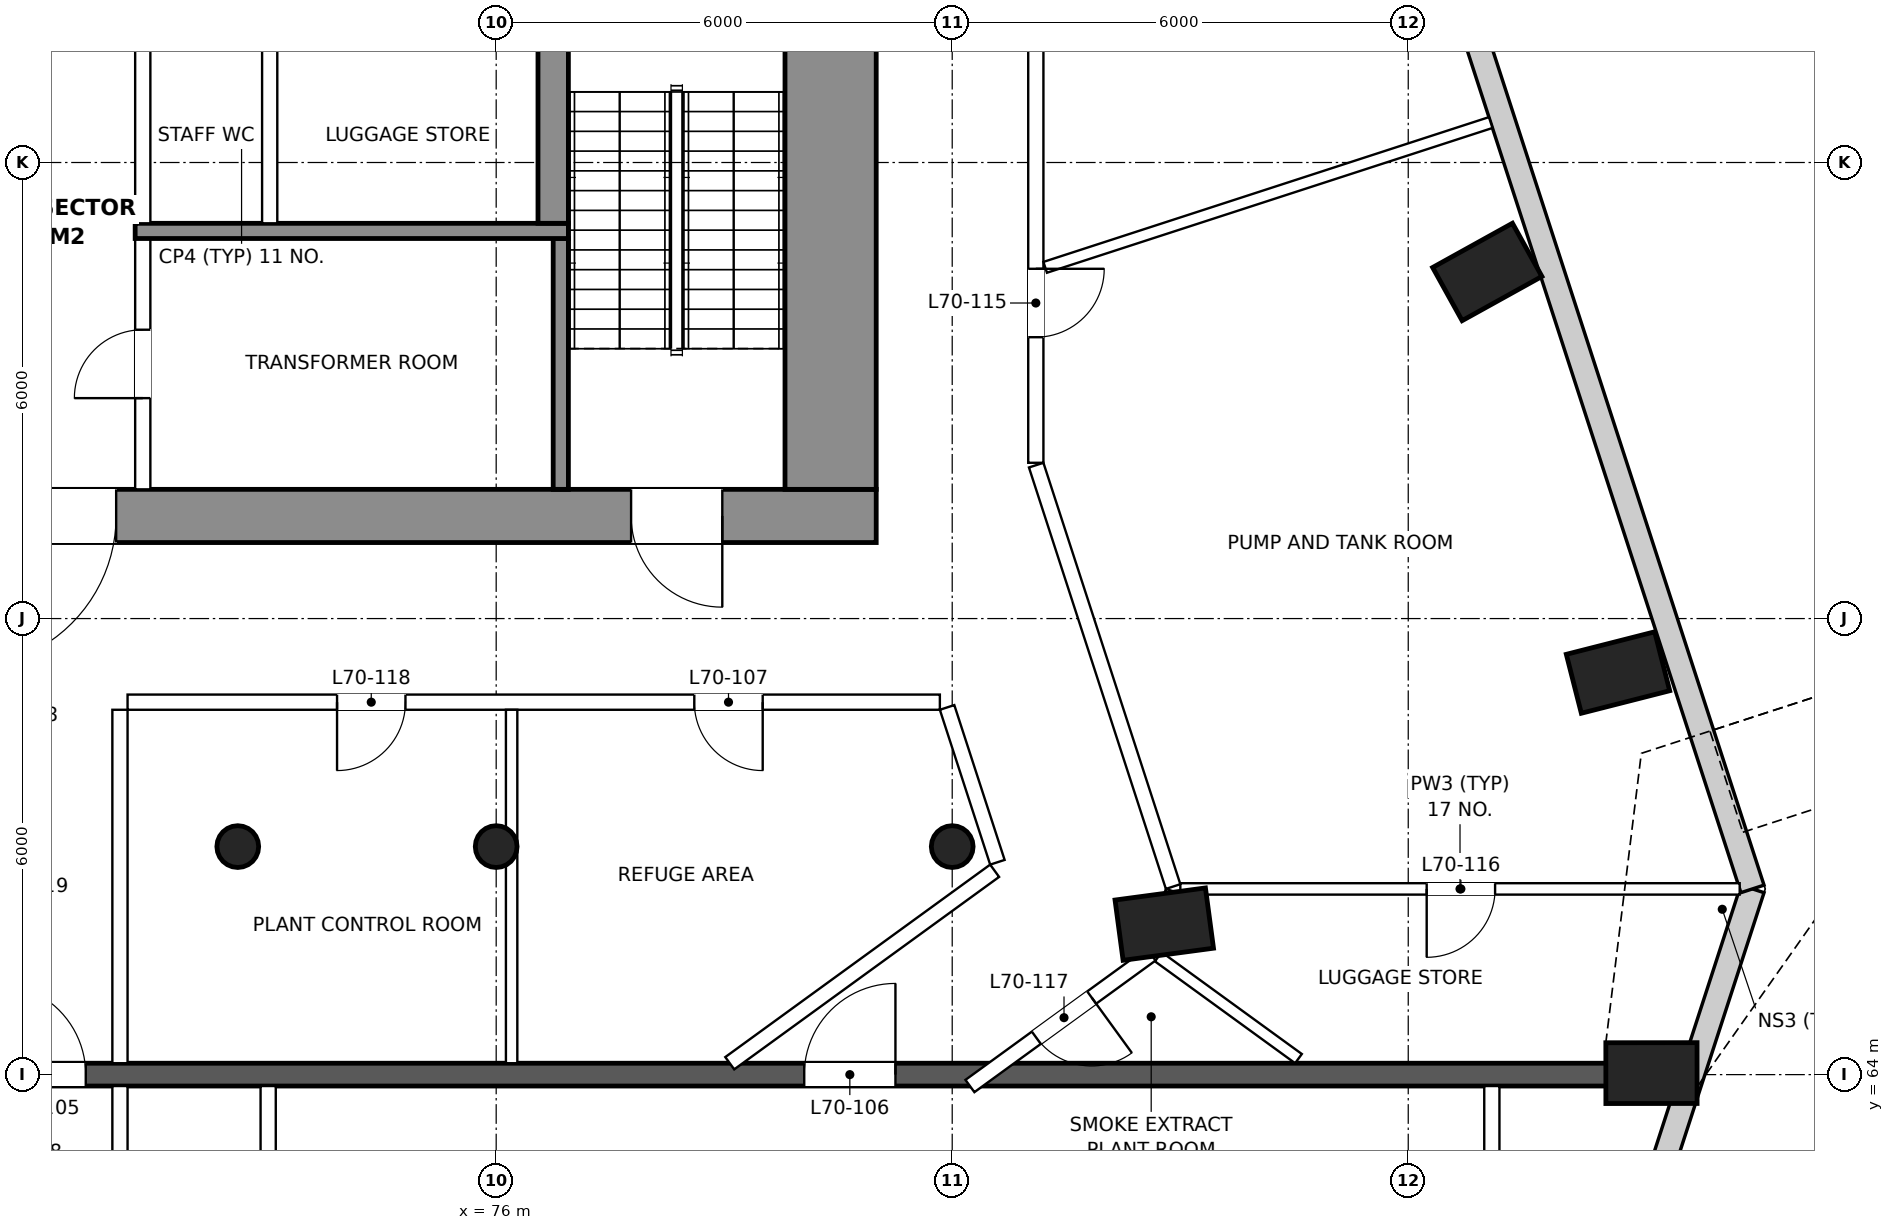
"""IFC4 building model, lengths in metres.
Left out: names, types, materials, properties, quantities, classifications, styles, units other than length and angle.
Written with IfcOpenShell. Run it as: python <this file> out.ifc"""

import sys

from ifc_helpers import new_model, si_unit, direction, frame, frame_2d, origin, origin_2d, place, context, subcontext, project, spatial, rectangle, circle, extrude, element, fill, save


model = new_model("IFC4")
c1 = context("Model", 3, precision=1e-05, world=origin(), true_north=direction((0.0, 1.0)))
c2 = subcontext(c1, "Body", "Model", "MODEL_VIEW")
j1 = project(units=[si_unit("LENGTHUNIT", "METRE"), si_unit("PLANEANGLEUNIT", "RADIAN")], contexts=[c1])
p1 = place(None, origin())
s1 = spatial("IfcSite", under=j1, at=p1, CompositionType="ELEMENT")
p2 = place(p1, origin())
s2 = spatial("IfcBuilding", under=s1, at=p2, CompositionType="ELEMENT")
p3 = place(p2, frame((0.0, 0.0, 295.1)))
s3 = spatial("IfcBuildingStorey", under=s2, at=p3, CompositionType="ELEMENT", Elevation=295.1)
for number, where, z_axis, x_axis in (
    (1, (91.2, 64.02, 0.0), (0.0, 0.0, 1.0), (0.001, -1.0, 0.0)),
    (2, (90.76, 69.29, 0.0), (0.0, 0.0, 1.0), (0.247, -0.969, 0.0)),
    (3, (89.04, 74.56, 0.0), (0.0, 0.0, 1.0), (0.485, -0.875, 0.0)),
    (4, (84.79, 65.98, 0.0), (0.0, 0.0, 1.0), (0.133, -0.991, 0.0)),
):
    element("IfcColumn", number, at=place(p3, frame(where, z_axis=z_axis, x_axis=x_axis)), inside=s3, PredefinedType="COLUMN", context=c2, shape_type="SweptSolid", body=[
        extrude(rectangle(XDim=0.8, YDim=1.2, at=origin_2d()), origin(), (0.0, 0.0, 1.0), 5.0),
    ])
for number, where, z_axis, x_axis in (
    (5, (72.6, 67.0, 0.0), (0.0, 0.0, 1.0), (1.0, 0.0, 0.0)),
    (6, (76.0, 67.0, 0.0), (0.0, 0.0, 1.0), (1.0, 0.0, 0.0)),
    (7, (82.0, 67.0, 0.0), (0.0, 0.0, 1.0), (1.0, 0.0, 0.0)),
):
    element("IfcColumn", number, at=place(p3, frame(where, z_axis=z_axis, x_axis=x_axis)), inside=s3, PredefinedType="COLUMN", context=c2, shape_type="SweptSolid", body=[
        extrude(circle(Radius=0.275, at=origin_2d()), origin(), (0.0, 0.0, 1.0), 5.0),
    ])
p4 = place(p3, frame((90.801, 61.126, 0.0), z_axis=(0.0, 0.0, 1.0), x_axis=(0.309039663735, 0.951049150275, 0.0)))
e8 = element("IfcWall", 8, at=p4, inside=s3, PredefinedType="SOLIDWALL", context=c2, shape_type="SweptSolid", body=[
    extrude(rectangle(XDim=5.591, YDim=0.32, at=frame_2d((2.795, 0.0))), origin(), (0.0, 0.0, 1.0), 4.6),
])
p5 = place(p3, frame((92.529, 66.443, 0.0), z_axis=(0.0, 0.0, 1.0), x_axis=(-0.30902093442, 0.951055236088, 0.0)))
e9 = element("IfcWall", 9, at=p5, inside=s3, PredefinedType="SOLIDWALL", context=c2, shape_type="SweptSolid", body=[
    extrude(rectangle(XDim=18.306, YDim=0.32, at=frame_2d((9.153, 0.0))), origin(), (0.0, 0.0, 1.0), 4.6),
])
p6 = place(p3, frame((59.0, 71.35, 0.0), z_axis=(0.0, 0.0, 1.0), x_axis=(1.0, 0.0, 0.0)))
e10 = element("IfcWall", 10, at=p6, inside=s3, PredefinedType="SHEAR", context=c2, shape_type="SweptSolid", body=[
    extrude(rectangle(XDim=22.0, YDim=0.7, at=frame_2d((11.0, 0.0))), origin(), (0.0, 0.0, 1.0), 5.0),
])
p7 = place(p6, frame((2.025, 0.0, 0.0)))
e11 = element("IfcOpeningElement", 11, at=p7, cuts=e10, PredefinedType="OPENING", context=c2, shape_type="SweptSolid", body=[
    extrude(rectangle(XDim=1.2, YDim=2.1, at=frame_2d((0.6, 1.05))), frame((0.0, 0.36, 0.0), z_axis=(0.0, -1.0, 0.0), x_axis=(1.0, 0.0, 0.0)), (0.0, 0.0, 1.0), 0.72),
])
p8 = place(p6, frame((18.775, 0.0, 0.0)))
e12 = element("IfcOpeningElement", 12, at=p8, cuts=e10, PredefinedType="OPENING", context=c2, shape_type="SweptSolid", body=[
    extrude(rectangle(XDim=1.2, YDim=2.1, at=frame_2d((0.6, 1.05))), frame((0.0, 0.36, 0.0), z_axis=(0.0, -1.0, 0.0), x_axis=(1.0, 0.0, 0.0)), (0.0, 0.0, 1.0), 0.72),
])
p9 = place(p6, frame((10.0, 0.0, 0.0)))
e13 = element("IfcOpeningElement", 13, at=p9, cuts=e10, PredefinedType="OPENING", context=c2, shape_type="SweptSolid", body=[
    extrude(rectangle(XDim=2.0, YDim=2.1, at=frame_2d((1.0, 1.05))), frame((0.0, 0.36, 0.0), z_axis=(0.0, -1.0, 0.0), x_axis=(1.0, 0.0, 0.0)), (0.0, 0.0, 1.0), 0.72),
])
p10 = place(p3, frame((71.35, 71.7, 0.0), z_axis=(0.0, 0.0, 1.0), x_axis=(0.0, 1.0, 0.0)))
e14 = element("IfcWall", 14, at=p10, inside=s3, PredefinedType="PARTITIONING", context=c2, shape_type="SweptSolid", body=[
    extrude(rectangle(XDim=3.3, YDim=0.2, at=frame_2d((1.65, 0.0))), origin(), (0.0, 0.0, 1.0), 4.6),
])
p11 = place(p10, frame((1.2, 0.0, 0.0)))
e15 = element("IfcOpeningElement", 15, at=p11, cuts=e14, PredefinedType="OPENING", context=c2, shape_type="SweptSolid", body=[
    extrude(rectangle(XDim=0.9, YDim=2.1, at=frame_2d((0.45, 1.05))), frame((0.0, 0.11, 0.0), z_axis=(0.0, -1.0, 0.0), x_axis=(1.0, 0.0, 0.0)), (0.0, 0.0, 1.0), 0.22),
])
p12 = place(p3, frame((76.85, 71.7, 0.0), z_axis=(0.0, 0.0, 1.0), x_axis=(0.0, 1.0, 0.0)))
e16 = element("IfcWall", 16, at=p12, inside=s3, PredefinedType="SHEAR", context=c2, shape_type="SweptSolid", body=[
    extrude(rectangle(XDim=3.3, YDim=0.2, at=frame_2d((1.65, 0.0))), origin(), (0.0, 0.0, 1.0), 5.0),
])
p13 = place(p3, frame((80.4, 71.7, 0.0), z_axis=(0.0, 0.0, 1.0), x_axis=(0.0, 1.0, 0.0)))
e17 = element("IfcWall", 17, at=p13, inside=s3, PredefinedType="SHEAR", context=c2, shape_type="SweptSolid", body=[
    extrude(rectangle(XDim=9.2, YDim=1.2, at=frame_2d((4.6, 0.0))), origin(), (0.0, 0.0, 1.0), 5.0),
])
p14 = place(p3, frame((71.25, 75.1, 0.0), z_axis=(0.0, 0.0, 1.0), x_axis=(1.0, 0.0, 0.0)))
e18 = element("IfcWall", 18, at=p14, inside=s3, PredefinedType="SHEAR", context=c2, shape_type="SweptSolid", body=[
    extrude(rectangle(XDim=5.7, YDim=0.2, at=frame_2d((2.85, 0.0))), origin(), (0.0, 0.0, 1.0), 5.0),
])
for number, where, z_axis, x_axis in (
    (19, (71.35, 75.2, 0.0), (0.0, 0.0, 1.0), (0.0, 1.0, 0.0)),
    (20, (73.02, 75.2, 0.0), (0.0, 0.0, 1.0), (0.0, 1.0, 0.0)),
):
    element("IfcWall", number, at=place(p3, frame(where, z_axis=z_axis, x_axis=x_axis)), inside=s3, PredefinedType="PARTITIONING", context=c2, shape_type="SweptSolid", body=[
        extrude(rectangle(XDim=2.3, YDim=0.2, at=frame_2d((1.15, 0.0))), origin(), (0.0, 0.0, 1.0), 4.6),
    ])
p15 = place(p3, frame((76.75, 75.2, 0.0), z_axis=(0.0, 0.0, 1.0), x_axis=(0.0, 1.0, 0.0)))
e21 = element("IfcWall", 21, at=p15, inside=s3, PredefinedType="SHEAR", context=c2, shape_type="SweptSolid", body=[
    extrude(rectangle(XDim=2.3, YDim=0.4, at=frame_2d((1.15, 0.0))), origin(), (0.0, 0.0, 1.0), 5.0),
])
p16 = place(p3, frame((48.433, 64.0, 0.0), z_axis=(0.0, 0.0, 1.0), x_axis=(1.0, 0.0, 0.0)))
e22 = element("IfcWall", 22, at=p16, inside=s3, PredefinedType="PARTITIONING", context=c2, shape_type="SweptSolid", body=[
    extrude(rectangle(XDim=43.134, YDim=0.3, at=frame_2d((21.567, 0.0))), origin(), (0.0, 0.0, 1.0), 3.9),
])
p17 = place(p16, frame((10.314, 0.0, 0.0)))
e23 = element("IfcOpeningElement", 23, at=p17, cuts=e22, PredefinedType="OPENING", context=c2, shape_type="SweptSolid", body=[
    extrude(rectangle(XDim=1.2, YDim=2.1, at=frame_2d((0.6, 1.05))), frame((0.0, 0.16, 0.0), z_axis=(0.0, -1.0, 0.0), x_axis=(1.0, 0.0, 0.0)), (0.0, 0.0, 1.0), 0.32),
])
p18 = place(p16, frame((20.967, 0.0, 0.0)))
e24 = element("IfcOpeningElement", 24, at=p18, cuts=e22, PredefinedType="OPENING", context=c2, shape_type="SweptSolid", body=[
    extrude(rectangle(XDim=1.2, YDim=2.1, at=frame_2d((0.6, 1.05))), frame((0.0, 0.16, 0.0), z_axis=(0.0, -1.0, 0.0), x_axis=(1.0, 0.0, 0.0)), (0.0, 0.0, 1.0), 0.32),
])
p19 = place(p16, frame((31.62, 0.0, 0.0)))
e25 = element("IfcOpeningElement", 25, at=p19, cuts=e22, PredefinedType="OPENING", context=c2, shape_type="SweptSolid", body=[
    extrude(rectangle(XDim=1.2, YDim=2.1, at=frame_2d((0.6, 1.05))), frame((0.0, 0.16, 0.0), z_axis=(0.0, -1.0, 0.0), x_axis=(1.0, 0.0, 0.0)), (0.0, 0.0, 1.0), 0.32),
])
p20 = place(p3, frame((83.1, 86.396, 0.0), z_axis=(0.0, 0.0, 1.0), x_axis=(0.0, -1.0, 0.0)))
e26 = element("IfcWall", 26, at=p20, inside=s3, PredefinedType="PARTITIONING", context=c2, shape_type="SweptSolid", body=[
    extrude(rectangle(XDim=14.347, YDim=0.2, at=frame_2d((7.173, 0.0))), origin(), (0.0, 0.0, 1.0), 4.15),
])
p21 = place(p20, frame((3.854, 0.0, 0.0)))
e27 = element("IfcOpeningElement", 27, at=p21, cuts=e26, PredefinedType="OPENING", context=c2, shape_type="SweptSolid", body=[
    extrude(rectangle(XDim=0.9, YDim=2.1, at=frame_2d((0.45, 1.05))), frame((0.0, 0.11, 0.0), z_axis=(0.0, -1.0, 0.0), x_axis=(1.0, 0.0, 0.0)), (0.0, 0.0, 1.0), 0.22),
])
p22 = place(p20, frame((7.751, 0.0, 0.0)))
e28 = element("IfcOpeningElement", 28, at=p22, cuts=e26, PredefinedType="OPENING", context=c2, shape_type="SweptSolid", body=[
    extrude(rectangle(XDim=0.9, YDim=2.1, at=frame_2d((0.45, 1.05))), frame((0.0, 0.11, 0.0), z_axis=(0.0, -1.0, 0.0), x_axis=(1.0, 0.0, 0.0)), (0.0, 0.0, 1.0), 0.22),
])
p23 = place(p20, frame((11.795, 0.0, 0.0)))
e29 = element("IfcOpeningElement", 29, at=p23, cuts=e26, PredefinedType="OPENING", context=c2, shape_type="SweptSolid", body=[
    extrude(rectangle(XDim=0.9, YDim=2.1, at=frame_2d((0.45, 1.05))), frame((0.0, 0.11, 0.0), z_axis=(0.0, -1.0, 0.0), x_axis=(1.0, 0.0, 0.0)), (0.0, 0.0, 1.0), 0.22),
])
p24 = place(p3, frame((83.105, 72.019, 0.0), z_axis=(0.0, 0.0, 1.0), x_axis=(0.30901978602, -0.95105560923, 0.0)))
e30 = element("IfcWall", 30, at=p24, inside=s3, PredefinedType="PARTITIONING", context=c2, shape_type="SweptSolid", body=[
    extrude(rectangle(XDim=5.83, YDim=0.2, at=frame_2d((2.915, 0.0))), origin(), (0.0, 0.0, 1.0), 4.6),
])
p25 = place(p3, frame((84.906, 66.412, 0.0), z_axis=(0.0, 0.0, 1.0), x_axis=(-0.309260889552, -0.950977235371, 0.0)))
e31 = element("IfcWall", 31, at=p25, inside=s3, PredefinedType="PARTITIONING", context=c2, shape_type="SweptSolid", body=[
    extrude(rectangle(XDim=0.821, YDim=0.2, at=frame_2d((0.411, 0.0))), origin(), (0.0, 0.0, 1.0), 3.6),
])
p26 = place(p3, frame((84.616, 65.582, 0.0), z_axis=(0.0, 0.0, 1.0), x_axis=(-0.809065647846, -0.587718280705, 0.0)))
e32 = element("IfcWall", 32, at=p26, inside=s3, PredefinedType="PARTITIONING", context=c2, shape_type="SweptSolid", body=[
    extrude(rectangle(XDim=2.946, YDim=0.2, at=frame_2d((1.473, 0.0))), origin(), (0.0, 0.0, 1.0), 3.6),
])
p27 = place(p26, frame((0.966, 0.0, 0.0)))
e33 = element("IfcOpeningElement", 33, at=p27, cuts=e32, PredefinedType="OPENING", context=c2, shape_type="SweptSolid", body=[
    extrude(rectangle(XDim=0.9, YDim=2.1, at=frame_2d((0.45, 1.05))), frame((0.0, 0.11, 0.0), z_axis=(0.0, -1.0, 0.0), x_axis=(1.0, 0.0, 0.0)), (0.0, 0.0, 1.0), 0.22),
])
p28 = place(p3, frame((89.1, 63.85, 0.0), z_axis=(0.0, 0.0, 1.0), x_axis=(0.0, -1.0, 0.0)))
e34 = element("IfcWall", 34, at=p28, inside=s3, PredefinedType="PARTITIONING", context=c2, shape_type="SweptSolid", body=[
    extrude(rectangle(XDim=3.762, YDim=0.2, at=frame_2d((1.881, 0.0))), origin(), (0.0, 0.0, 1.0), 4.6),
])
p29 = place(p3, frame((82.594, 66.794, 0.0), z_axis=(0.0, 0.0, 1.0), x_axis=(-0.309003597347, 0.951060869149, 0.0)))
e35 = element("IfcWall", 35, at=p29, inside=s3, PredefinedType="PARTITIONING", context=c2, shape_type="SweptSolid", body=[
    extrude(rectangle(XDim=2.142, YDim=0.2, at=frame_2d((1.071, 0.0))), origin(), (0.0, 0.0, 1.0), 4.6),
])
p30 = place(p3, frame((81.837, 68.9, 0.0), z_axis=(0.0, 0.0, 1.0), x_axis=(-1.0, 0.0, 0.0)))
e36 = element("IfcWall", 36, at=p30, inside=s3, PredefinedType="PARTITIONING", context=c2, shape_type="SweptSolid", body=[
    extrude(rectangle(XDim=10.688, YDim=0.2, at=frame_2d((5.344, 0.0))), origin(), (0.0, 0.0, 1.0), 4.6),
])
p31 = place(p30, frame((2.331, 0.0, 0.0)))
e37 = element("IfcOpeningElement", 37, at=p31, cuts=e36, PredefinedType="OPENING", context=c2, shape_type="SweptSolid", body=[
    extrude(rectangle(XDim=0.9, YDim=2.1, at=frame_2d((0.45, 1.05))), frame((0.0, 0.11, 0.0), z_axis=(0.0, -1.0, 0.0), x_axis=(1.0, 0.0, 0.0)), (0.0, 0.0, 1.0), 0.22),
])
p32 = place(p30, frame((7.031, 0.0, 0.0)))
e38 = element("IfcOpeningElement", 38, at=p32, cuts=e36, PredefinedType="OPENING", context=c2, shape_type="SweptSolid", body=[
    extrude(rectangle(XDim=0.9, YDim=2.1, at=frame_2d((0.45, 1.05))), frame((0.0, 0.11, 0.0), z_axis=(0.0, -1.0, 0.0), x_axis=(1.0, 0.0, 0.0)), (0.0, 0.0, 1.0), 0.22),
])
p33 = place(p3, frame((71.05, 68.8, 0.0), z_axis=(0.0, 0.0, 1.0), x_axis=(0.0, -1.0, 0.0)))
e39 = element("IfcWall", 39, at=p33, inside=s3, PredefinedType="PARTITIONING", context=c2, shape_type="SweptSolid", body=[
    extrude(rectangle(XDim=4.65, YDim=0.2, at=frame_2d((2.325, 0.0))), origin(), (0.0, 0.0, 1.0), 4.6),
])
p34 = place(p3, frame((71.05, 63.85, 0.0), z_axis=(0.0, 0.0, 1.0), x_axis=(0.0, -1.0, 0.0)))
e40 = element("IfcWall", 40, at=p34, inside=s3, PredefinedType="PARTITIONING", context=c2, shape_type="SweptSolid", body=[
    extrude(rectangle(XDim=5.333, YDim=0.2, at=frame_2d((2.667, 0.0))), origin(), (0.0, 0.0, 1.0), 3.6),
])
p35 = place(p3, frame((73.0, 59.789, 0.0), z_axis=(0.0, 0.0, 1.0), x_axis=(0.0, 1.0, 0.0)))
e41 = element("IfcWall", 41, at=p35, inside=s3, PredefinedType="PARTITIONING", context=c2, shape_type="SweptSolid", body=[
    extrude(rectangle(XDim=4.062, YDim=0.2, at=frame_2d((2.031, 0.0))), origin(), (0.0, 0.0, 1.0), 3.6),
])
p36 = place(p3, frame((79.073, 64.15, 0.0), z_axis=(0.0, 0.0, 1.0), x_axis=(0.809027628487, 0.587770615414, 0.0)))
e42 = element("IfcWall", 42, at=p36, inside=s3, PredefinedType="PARTITIONING", context=c2, shape_type="SweptSolid", body=[
    extrude(rectangle(XDim=4.308, YDim=0.2, at=frame_2d((2.154, 0.0))), origin(), (0.0, 0.0, 1.0), 3.6),
])
p37 = place(p3, frame((86.556, 64.211, 0.0), z_axis=(0.0, 0.0, 1.0), x_axis=(-0.809018460862, 0.587783233841, 0.0)))
e43 = element("IfcWall", 43, at=p37, inside=s3, PredefinedType="PARTITIONING", context=c2, shape_type="SweptSolid", body=[
    extrude(rectangle(XDim=2.28, YDim=0.15, at=frame_2d((1.14, 0.0))), origin(), (0.0, 0.0, 1.0), 4.6),
])
p38 = place(p3, frame((92.361, 66.443, 0.0), z_axis=(0.0, 0.0, 1.0), x_axis=(-1.0, 0.0, 0.0)))
e44 = element("IfcWall", 44, at=p38, inside=s3, PredefinedType="PARTITIONING", context=c2, shape_type="SweptSolid", body=[
    extrude(rectangle(XDim=7.359, YDim=0.15, at=frame_2d((3.68, 0.0))), origin(), (0.0, 0.0, 1.0), 3.9),
])
p39 = place(p38, frame((3.218, 0.0, 0.0)))
e45 = element("IfcOpeningElement", 45, at=p39, cuts=e44, PredefinedType="OPENING", context=c2, shape_type="SweptSolid", body=[
    extrude(rectangle(XDim=0.9, YDim=2.1, at=frame_2d((0.45, 1.05))), frame((0.0, 0.085, 0.0), z_axis=(0.0, -1.0, 0.0), x_axis=(1.0, 0.0, 0.0)), (0.0, 0.0, 1.0), 0.17),
])
p40 = place(p3, frame((89.085, 76.525, 0.0), z_axis=(0.0, 0.0, 1.0), x_axis=(-0.951060263663, -0.309005460926, 0.0)))
e46 = element("IfcWall", 46, at=p40, inside=s3, PredefinedType="PARTITIONING", context=c2, shape_type="SweptSolid", body=[
    extrude(rectangle(XDim=6.164, YDim=0.15, at=frame_2d((3.082, 0.0))), origin(), (0.0, 0.0, 1.0), 4.6),
])
p41 = place(p3, frame((76.203, 64.15, 0.0), z_axis=(0.0, 0.0, 1.0), x_axis=(0.0, 1.0, 0.0)))
e47 = element("IfcWall", 47, at=p41, inside=s3, PredefinedType="PARTITIONING", context=c2, shape_type="SweptSolid", body=[
    extrude(rectangle(XDim=4.65, YDim=0.15, at=frame_2d((2.325, 0.0))), origin(), (0.0, 0.0, 1.0), 4.6),
])
p42 = place(p8, frame((1.2, 0.0, 0.0), z_axis=(0.0, 0.0, 1.0), x_axis=(-1.0, 0.0, 0.0)))
e48 = element("IfcDoor", 48, at=p42, inside=s3, OperationType="SINGLE_SWING_LEFT", PredefinedType="DOOR", context=c2, shape_type="SweptSolid", body=[
    extrude(rectangle(XDim=1.2, YDim=2.1, at=frame_2d((0.6, 1.05))), frame((0.0, 0.025, 0.0), z_axis=(0.0, -1.0, 0.0), x_axis=(1.0, 0.0, 0.0)), (0.0, 0.0, 1.0), 0.05),
])
fill(e12, e48)
p43 = place(p9, frame((2.0, 0.0, 0.0), z_axis=(0.0, 0.0, 1.0), x_axis=(-1.0, 0.0, 0.0)))
e49 = element("IfcDoor", 49, at=p43, inside=s3, OperationType="DOUBLE_DOOR_SINGLE_SWING", PredefinedType="DOOR", context=c2, shape_type="SweptSolid", body=[
    extrude(rectangle(XDim=2.0, YDim=2.1, at=frame_2d((1.0, 1.05))), frame((0.0, 0.025, 0.0), z_axis=(0.0, -1.0, 0.0), x_axis=(1.0, 0.0, 0.0)), (0.0, 0.0, 1.0), 0.05),
])
fill(e13, e49)
p44 = place(p11, origin())
e50 = element("IfcDoor", 50, at=p44, inside=s3, OperationType="SINGLE_SWING_LEFT", PredefinedType="DOOR", context=c2, shape_type="SweptSolid", body=[
    extrude(rectangle(XDim=0.9, YDim=2.1, at=frame_2d((0.45, 1.05))), frame((0.0, 0.025, 0.0), z_axis=(0.0, -1.0, 0.0), x_axis=(1.0, 0.0, 0.0)), (0.0, 0.0, 1.0), 0.05),
])
fill(e15, e50)
p45 = place(p18, origin())
e51 = element("IfcDoor", 51, at=p45, inside=s3, OperationType="SINGLE_SWING_LEFT", PredefinedType="DOOR", context=c2, shape_type="SweptSolid", body=[
    extrude(rectangle(XDim=1.2, YDim=2.1, at=frame_2d((0.6, 1.05))), frame((0.0, 0.025, 0.0), z_axis=(0.0, -1.0, 0.0), x_axis=(1.0, 0.0, 0.0)), (0.0, 0.0, 1.0), 0.05),
])
fill(e24, e51)
p46 = place(p19, origin())
e52 = element("IfcDoor", 52, at=p46, inside=s3, OperationType="SINGLE_SWING_RIGHT", PredefinedType="DOOR", context=c2, shape_type="SweptSolid", body=[
    extrude(rectangle(XDim=1.2, YDim=2.1, at=frame_2d((0.6, 1.05))), frame((0.0, 0.025, 0.0), z_axis=(0.0, -1.0, 0.0), x_axis=(1.0, 0.0, 0.0)), (0.0, 0.0, 1.0), 0.05),
])
fill(e25, e52)
p47 = place(p31, origin())
e53 = element("IfcDoor", 53, at=p47, inside=s3, OperationType="SINGLE_SWING_LEFT", PredefinedType="DOOR", context=c2, shape_type="SweptSolid", body=[
    extrude(rectangle(XDim=0.9, YDim=2.1, at=frame_2d((0.45, 1.05))), frame((0.0, 0.025, 0.0), z_axis=(0.0, -1.0, 0.0), x_axis=(1.0, 0.0, 0.0)), (0.0, 0.0, 1.0), 0.05),
])
fill(e37, e53)
p48 = place(p23, origin())
e54 = element("IfcDoor", 54, at=p48, inside=s3, OperationType="SINGLE_SWING_LEFT", PredefinedType="DOOR", context=c2, shape_type="SweptSolid", body=[
    extrude(rectangle(XDim=0.9, YDim=2.1, at=frame_2d((0.45, 1.05))), frame((0.0, 0.025, 0.0), z_axis=(0.0, -1.0, 0.0), x_axis=(1.0, 0.0, 0.0)), (0.0, 0.0, 1.0), 0.05),
])
fill(e29, e54)
p49 = place(p39, origin())
e55 = element("IfcDoor", 55, at=p49, inside=s3, OperationType="SINGLE_SWING_RIGHT", PredefinedType="DOOR", context=c2, shape_type="SweptSolid", body=[
    extrude(rectangle(XDim=0.9, YDim=2.1, at=frame_2d((0.45, 1.05))), frame((0.0, 0.025, 0.0), z_axis=(0.0, -1.0, 0.0), x_axis=(1.0, 0.0, 0.0)), (0.0, 0.0, 1.0), 0.05),
])
fill(e45, e55)
p50 = place(p27, origin())
e56 = element("IfcDoor", 56, at=p50, inside=s3, OperationType="SINGLE_SWING_LEFT", PredefinedType="DOOR", context=c2, shape_type="SweptSolid", body=[
    extrude(rectangle(XDim=0.9, YDim=2.1, at=frame_2d((0.45, 1.05))), frame((0.0, 0.025, 0.0), z_axis=(0.0, -1.0, 0.0), x_axis=(1.0, 0.0, 0.0)), (0.0, 0.0, 1.0), 0.05),
])
fill(e33, e56)
p51 = place(p32, origin())
e57 = element("IfcDoor", 57, at=p51, inside=s3, OperationType="SINGLE_SWING_RIGHT", PredefinedType="DOOR", context=c2, shape_type="SweptSolid", body=[
    extrude(rectangle(XDim=0.9, YDim=2.1, at=frame_2d((0.45, 1.05))), frame((0.0, 0.025, 0.0), z_axis=(0.0, -1.0, 0.0), x_axis=(1.0, 0.0, 0.0)), (0.0, 0.0, 1.0), 0.05),
])
fill(e38, e57)
save(model, sys.argv[1])
